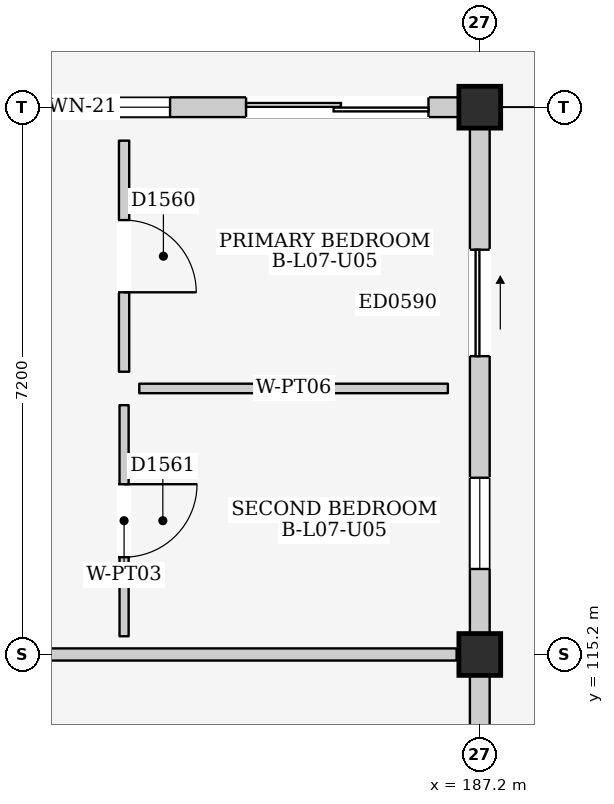
"""IFC4 building model, lengths in metres.
Left out: names, types, materials, properties, quantities, classifications, styles, units other than length and angle.
Written with IfcOpenShell. Run it as: python <this file> out.ifc"""

import sys

from ifc_helpers import new_model, si_unit, direction, frame, frame_2d, origin, origin_2d, place, context, subcontext, project, spatial, rectangle, extrude, element, fill, save


model = new_model("IFC4")
c1 = context("Model", 3, precision=1e-05, world=origin(), true_north=direction((0.0, 1.0)))
c2 = subcontext(c1, "Body", "Model", "MODEL_VIEW")
j1 = project(units=[si_unit("LENGTHUNIT", "METRE"), si_unit("PLANEANGLEUNIT", "RADIAN")], contexts=[c1])
p1 = place(None, origin())
s1 = spatial("IfcSite", under=j1, at=p1, CompositionType="ELEMENT")
p2 = place(p1, origin())
s2 = spatial("IfcBuilding", under=s1, at=p2, CompositionType="ELEMENT")
p3 = place(p2, frame((0.0, 0.0, 25.1)))
s3 = spatial("IfcBuildingStorey", under=s2, at=p3, CompositionType="ELEMENT", Elevation=25.1)
for number, where, z_axis, x_axis in (
    (1, (187.2, 115.2, 0.0), (0.0, 0.0, 1.0), (1.0, 0.0, 0.0)),
    (2, (187.2, 122.4, 0.0), (0.0, 0.0, 1.0), (1.0, 0.0, 0.0)),
):
    element("IfcColumn", number, at=place(p3, frame(where, z_axis=z_axis, x_axis=x_axis)), inside=s3, PredefinedType="COLUMN", context=c2, shape_type="SweptSolid", body=[
        extrude(rectangle(XDim=0.55, YDim=0.55, at=origin_2d()), origin(), (0.0, 0.0, 1.0), 3.2),
    ])
p4 = place(p3, frame((187.2, 108.275, 0.0), z_axis=(0.0, 0.0, 1.0), x_axis=(0.0, 1.0, 0.0)))
e3 = element("IfcWall", 3, at=p4, inside=s3, PredefinedType="ELEMENTEDWALL", context=c2, shape_type="SweptSolid", body=[
    extrude(rectangle(XDim=6.65, YDim=0.26, at=frame_2d((3.325, 0.0))), origin(), (0.0, 0.0, 1.0), 2.525),
])
p5 = place(p4, frame((3.65, 0.0, 0.0)))
e4 = element("IfcOpeningElement", 4, at=p5, cuts=e3, PredefinedType="OPENING", context=c2, shape_type="SweptSolid", body=[
    extrude(rectangle(XDim=1.4, YDim=2.1, at=frame_2d((0.7, 1.05))), frame((0.0, 0.145, 0.0), z_axis=(0.0, -1.0, 0.0), x_axis=(1.0, 0.0, 0.0)), (0.0, 0.0, 1.0), 0.29),
])
p6 = place(p3, frame((180.275, 122.4, 0.0), z_axis=(0.0, 0.0, 1.0), x_axis=(1.0, 0.0, 0.0)))
e5 = element("IfcWall", 5, at=p6, inside=s3, PredefinedType="ELEMENTEDWALL", context=c2, shape_type="SweptSolid", body=[
    extrude(rectangle(XDim=6.65, YDim=0.26, at=frame_2d((3.325, 0.0))), origin(), (0.0, 0.0, 1.0), 2.525),
])
p7 = place(p6, frame((3.85, 0.0, 0.0)))
e6 = element("IfcOpeningElement", 6, at=p7, cuts=e5, PredefinedType="OPENING", context=c2, shape_type="SweptSolid", body=[
    extrude(rectangle(XDim=2.4, YDim=2.12, at=frame_2d((1.2, 1.06))), frame((0.0, 0.145, 0.0), z_axis=(0.0, -1.0, 0.0), x_axis=(1.0, 0.0, 0.0)), (0.0, 0.0, 1.0), 0.29),
])
p8 = place(p6, frame((0.55, 0.0, 0.815)))
e7 = element("IfcOpeningElement", 7, at=p8, cuts=e5, PredefinedType="OPENING", context=c2, shape_type="SweptSolid", body=[
    extrude(rectangle(XDim=2.3, YDim=1.6, at=frame_2d((1.15, 0.8))), frame((0.0, 0.145, 0.0), z_axis=(0.0, -1.0, 0.0), x_axis=(1.0, 0.0, 0.0)), (0.0, 0.0, 1.0), 0.29),
])
p9 = place(p3, frame((187.2, 115.475, 0.0), z_axis=(0.0, 0.0, 1.0), x_axis=(0.0, 1.0, 0.0)))
e8 = element("IfcWall", 8, at=p9, inside=s3, PredefinedType="ELEMENTEDWALL", context=c2, shape_type="SweptSolid", body=[
    extrude(rectangle(XDim=6.65, YDim=0.26, at=frame_2d((3.325, 0.0))), origin(), (0.0, 0.0, 1.0), 2.525),
])
p10 = place(p9, frame((3.65, 0.0, 0.0)))
e9 = element("IfcOpeningElement", 9, at=p10, cuts=e8, PredefinedType="OPENING", context=c2, shape_type="SweptSolid", body=[
    extrude(rectangle(XDim=1.4, YDim=2.1, at=frame_2d((0.7, 1.05))), frame((0.0, 0.145, 0.0), z_axis=(0.0, -1.0, 0.0), x_axis=(1.0, 0.0, 0.0)), (0.0, 0.0, 1.0), 0.29),
])
p11 = place(p9, frame((0.85, 0.0, 0.95)))
e10 = element("IfcOpeningElement", 10, at=p11, cuts=e8, PredefinedType="OPENING", context=c2, shape_type="SweptSolid", body=[
    extrude(rectangle(XDim=1.2, YDim=1.35, at=frame_2d((0.6, 0.675))), frame((0.0, 0.145, 0.0), z_axis=(0.0, -1.0, 0.0), x_axis=(1.0, 0.0, 0.0)), (0.0, 0.0, 1.0), 0.29),
])
p12 = place(p3, frame((180.305, 115.2, 0.0), z_axis=(0.0, 0.0, 1.0), x_axis=(1.0, 0.0, 0.0)))
e11 = element("IfcWall", 11, at=p12, inside=s3, PredefinedType="PARTITIONING", context=c2, shape_type="SweptSolid", body=[
    extrude(rectangle(XDim=6.59, YDim=0.16, at=frame_2d((3.295, 0.0))), origin(), (0.0, 0.0, 1.0), 2.375),
])
p13 = place(p3, frame((182.52, 118.92, 0.0), z_axis=(0.0, 0.0, 1.0), x_axis=(0.0, 1.0, 0.0)))
e12 = element("IfcWall", 12, at=p13, inside=s3, PredefinedType="PARTITIONING", context=c2, shape_type="SweptSolid", body=[
    extrude(rectangle(XDim=3.04, YDim=0.135, at=frame_2d((1.52, 0.0))), origin(), (0.0, 0.0, 1.0), 2.99),
])
p14 = place(p13, frame((1.045, 0.0, 0.0)))
e13 = element("IfcOpeningElement", 13, at=p14, cuts=e12, PredefinedType="OPENING", context=c2, shape_type="SweptSolid", body=[
    extrude(rectangle(XDim=0.95, YDim=2.15, at=frame_2d((0.475, 1.075))), frame((0.0, 0.083, 0.0), z_axis=(0.0, -1.0, 0.0), x_axis=(1.0, 0.0, 0.0)), (0.0, 0.0, 1.0), 0.165),
])
p15 = place(p3, frame((182.72, 118.7, 0.0), z_axis=(0.0, 0.0, 1.0), x_axis=(1.0, 0.0, 0.0)))
e14 = element("IfcWall", 14, at=p15, inside=s3, PredefinedType="PARTITIONING", context=c2, shape_type="SweptSolid", body=[
    extrude(rectangle(XDim=4.06, YDim=0.125, at=frame_2d((2.03, 0.0))), origin(), (0.0, 0.0, 1.0), 2.99),
])
p16 = place(p3, frame((182.52, 115.44, 0.0), z_axis=(0.0, 0.0, 1.0), x_axis=(0.0, 1.0, 0.0)))
e15 = element("IfcWall", 15, at=p16, inside=s3, PredefinedType="PARTITIONING", context=c2, shape_type="SweptSolid", body=[
    extrude(rectangle(XDim=3.04, YDim=0.12, at=frame_2d((1.52, 0.0))), origin(), (0.0, 0.0, 1.0), 2.99),
])
p17 = place(p16, frame((1.04, 0.0, 0.0)))
e16 = element("IfcOpeningElement", 16, at=p17, cuts=e15, PredefinedType="OPENING", context=c2, shape_type="SweptSolid", body=[
    extrude(rectangle(XDim=0.96, YDim=2.15, at=frame_2d((0.48, 1.075))), frame((0.0, 0.075, 0.0), z_axis=(0.0, -1.0, 0.0), x_axis=(1.0, 0.0, 0.0)), (0.0, 0.0, 1.0), 0.15),
])
p18 = place(p7, frame((2.4, 0.0, 0.0), z_axis=(0.0, 0.0, 1.0), x_axis=(-1.0, 0.0, 0.0)))
e17 = element("IfcDoor", 17, at=p18, inside=s3, OperationType="DOUBLE_DOOR_SLIDING", PredefinedType="DOOR", context=c2, shape_type="SweptSolid", body=[
    extrude(rectangle(XDim=2.4, YDim=2.12, at=frame_2d((1.2, 1.06))), frame((0.0, 0.025, 0.0), z_axis=(0.0, -1.0, 0.0), x_axis=(1.0, 0.0, 0.0)), (0.0, 0.0, 1.0), 0.05),
])
fill(e6, e17)
p19 = place(p8, origin())
e18 = element("IfcWindow", 18, at=p19, inside=s3, PartitioningType="TRIPLE_PANEL_VERTICAL", PredefinedType="WINDOW", context=c2, shape_type="SweptSolid", body=[
    extrude(rectangle(XDim=2.3, YDim=1.6, at=frame_2d((1.15, 0.8))), frame((0.0, 0.03, 0.0), z_axis=(0.0, -1.0, 0.0), x_axis=(1.0, 0.0, 0.0)), (0.0, 0.0, 1.0), 0.06),
])
fill(e7, e18)
p20 = place(p10, frame((1.4, 0.0, 0.0), z_axis=(0.0, 0.0, 1.0), x_axis=(-1.0, 0.0, 0.0)))
e19 = element("IfcDoor", 19, at=p20, inside=s3, OperationType="SLIDING_TO_RIGHT", PredefinedType="DOOR", context=c2, shape_type="SweptSolid", body=[
    extrude(rectangle(XDim=1.4, YDim=2.1, at=frame_2d((0.7, 1.05))), frame((0.0, 0.025, 0.0), z_axis=(0.0, -1.0, 0.0), x_axis=(1.0, 0.0, 0.0)), (0.0, 0.0, 1.0), 0.05),
])
fill(e9, e19)
p21 = place(p11, origin())
e20 = element("IfcWindow", 20, at=p21, inside=s3, PartitioningType="SINGLE_PANEL", PredefinedType="WINDOW", context=c2, shape_type="SweptSolid", body=[
    extrude(rectangle(XDim=1.2, YDim=1.35, at=frame_2d((0.6, 0.675))), frame((0.0, 0.03, 0.0), z_axis=(0.0, -1.0, 0.0), x_axis=(1.0, 0.0, 0.0)), (0.0, 0.0, 1.0), 0.06),
])
fill(e10, e20)
p22 = place(p14, frame((0.95, 0.0, 0.0), z_axis=(0.0, 0.0, 1.0), x_axis=(-1.0, 0.0, 0.0)))
e21 = element("IfcDoor", 21, at=p22, inside=s3, OperationType="SINGLE_SWING_RIGHT", PredefinedType="DOOR", context=c2, shape_type="SweptSolid", body=[
    extrude(rectangle(XDim=0.95, YDim=2.15, at=frame_2d((0.475, 1.075))), frame((0.0, 0.025, 0.0), z_axis=(0.0, -1.0, 0.0), x_axis=(1.0, 0.0, 0.0)), (0.0, 0.0, 1.0), 0.05),
])
fill(e13, e21)
p23 = place(p17, frame((0.96, 0.0, 0.0), z_axis=(0.0, 0.0, 1.0), x_axis=(-1.0, 0.0, 0.0)))
e22 = element("IfcDoor", 22, at=p23, inside=s3, OperationType="SINGLE_SWING_LEFT", PredefinedType="DOOR", context=c2, shape_type="SweptSolid", body=[
    extrude(rectangle(XDim=0.96, YDim=2.15, at=frame_2d((0.48, 1.075))), frame((0.0, 0.025, 0.0), z_axis=(0.0, -1.0, 0.0), x_axis=(1.0, 0.0, 0.0)), (0.0, 0.0, 1.0), 0.05),
])
fill(e16, e22)
save(model, sys.argv[1])
